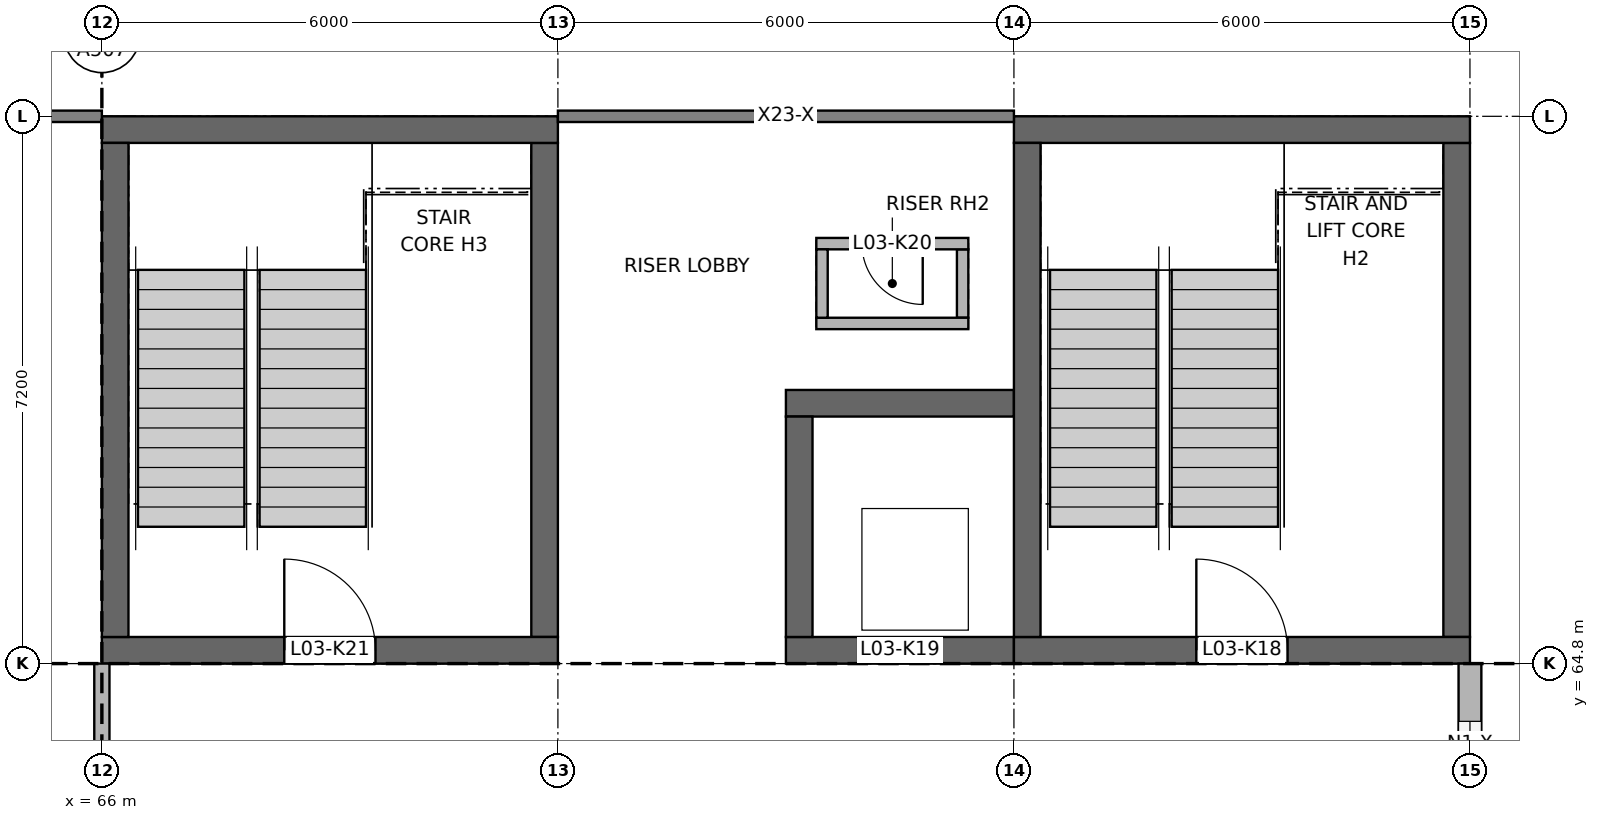
"""IFC4 building model, lengths in metres.
Left out: names, types, materials, properties, quantities, classifications, styles, units other than length and angle.
Written with IfcOpenShell. Run it as: python <this file> out.ifc"""

import sys

from ifc_helpers import new_model, si_unit, direction, frame, frame_2d, origin, place, context, subcontext, project, spatial, rectangle, extrude, element, fill, save


model = new_model("IFC4")
c1 = context("Model", 3, precision=1e-05, world=origin(), true_north=direction((0.0, 1.0)))
c2 = subcontext(c1, "Body", "Model", "MODEL_VIEW")
j1 = project(units=[si_unit("LENGTHUNIT", "METRE"), si_unit("PLANEANGLEUNIT", "RADIAN")], contexts=[c1])
p1 = place(None, origin())
s1 = spatial("IfcSite", under=j1, at=p1, CompositionType="ELEMENT")
p2 = place(p1, origin())
s2 = spatial("IfcBuilding", under=s1, at=p2, CompositionType="ELEMENT")
p3 = place(p2, frame((0.0, 0.0, 12.6)))
s3 = spatial("IfcBuildingStorey", under=s2, at=p3, CompositionType="ELEMENT", Elevation=12.6)
p4 = place(p3, frame((78.0, 64.975, 0.0), z_axis=(0.0, 0.0, 1.0), x_axis=(1.0, 0.0, 0.0)))
e1 = element("IfcWall", 1, at=p4, inside=s3, PredefinedType="SHEAR", context=c2, shape_type="SweptSolid", body=[
    extrude(rectangle(XDim=6.0, YDim=0.35, at=frame_2d((3.0, 0.0))), origin(), (0.0, 0.0, 1.0), 4.0),
])
p5 = place(p4, frame((2.4, 0.0, 0.0)))
e2 = element("IfcOpeningElement", 2, at=p5, cuts=e1, PredefinedType="OPENING", context=c2, shape_type="SweptSolid", body=[
    extrude(rectangle(XDim=1.2, YDim=2.1, at=frame_2d((0.6, 1.05))), frame((0.0, 0.185, 0.0), z_axis=(0.0, -1.0, 0.0), x_axis=(1.0, 0.0, 0.0)), (0.0, 0.0, 1.0), 0.37),
])
p6 = place(p3, frame((78.0, 71.825, 0.0), z_axis=(0.0, 0.0, 1.0), x_axis=(1.0, 0.0, 0.0)))
e3 = element("IfcWall", 3, at=p6, inside=s3, PredefinedType="SHEAR", context=c2, shape_type="SweptSolid", body=[
    extrude(rectangle(XDim=6.0, YDim=0.35, at=frame_2d((3.0, 0.0))), origin(), (0.0, 0.0, 1.0), 4.0),
])
for number, where, z_axis, x_axis in (
    (4, (78.175, 65.15, 0.0), (0.0, 0.0, 1.0), (0.0, 1.0, 0.0)),
    (5, (83.825, 65.15, 0.0), (0.0, 0.0, 1.0), (0.0, 1.0, 0.0)),
):
    element("IfcWall", number, at=place(p3, frame(where, z_axis=z_axis, x_axis=x_axis)), inside=s3, PredefinedType="SHEAR", context=c2, shape_type="SweptSolid", body=[
        extrude(rectangle(XDim=6.5, YDim=0.35, at=frame_2d((3.25, 0.0))), origin(), (0.0, 0.0, 1.0), 4.0),
    ])
p7 = place(p3, frame((75.0, 64.975, 0.0), z_axis=(0.0, 0.0, 1.0), x_axis=(1.0, 0.0, 0.0)))
e6 = element("IfcWall", 6, at=p7, inside=s3, PredefinedType="SHEAR", context=c2, shape_type="SweptSolid", body=[
    extrude(rectangle(XDim=3.0, YDim=0.35, at=frame_2d((1.5, 0.0))), origin(), (0.0, 0.0, 1.0), 4.2),
])
p8 = place(p7, frame((0.95, 0.0, 0.0)))
e7 = element("IfcOpeningElement", 7, at=p8, cuts=e6, PredefinedType="OPENING", context=c2, shape_type="SweptSolid", body=[
    extrude(rectangle(XDim=1.1, YDim=2.1, at=frame_2d((0.55, 1.05))), frame((0.0, 0.185, 0.0), z_axis=(0.0, -1.0, 0.0), x_axis=(1.0, 0.0, 0.0)), (0.0, 0.0, 1.0), 0.37),
])
p9 = place(p3, frame((75.0, 68.225, 0.0), z_axis=(0.0, 0.0, 1.0), x_axis=(1.0, 0.0, 0.0)))
e8 = element("IfcWall", 8, at=p9, inside=s3, PredefinedType="SHEAR", context=c2, shape_type="SweptSolid", body=[
    extrude(rectangle(XDim=3.0, YDim=0.35, at=frame_2d((1.5, 0.0))), origin(), (0.0, 0.0, 1.0), 4.2),
])
p10 = place(p3, frame((75.175, 65.15, 0.0), z_axis=(0.0, 0.0, 1.0), x_axis=(0.0, 1.0, 0.0)))
e9 = element("IfcWall", 9, at=p10, inside=s3, PredefinedType="SHEAR", context=c2, shape_type="SweptSolid", body=[
    extrude(rectangle(XDim=2.9, YDim=0.35, at=frame_2d((1.45, 0.0))), origin(), (0.0, 0.0, 1.0), 4.2),
])
p11 = place(p3, frame((66.0, 64.975, 0.0), z_axis=(0.0, 0.0, 1.0), x_axis=(1.0, 0.0, 0.0)))
e10 = element("IfcWall", 10, at=p11, inside=s3, PredefinedType="SHEAR", context=c2, shape_type="SweptSolid", body=[
    extrude(rectangle(XDim=6.0, YDim=0.35, at=frame_2d((3.0, 0.0))), origin(), (0.0, 0.0, 1.0), 4.0),
])
p12 = place(p11, frame((2.4, 0.0, 0.0)))
e11 = element("IfcOpeningElement", 11, at=p12, cuts=e10, PredefinedType="OPENING", context=c2, shape_type="SweptSolid", body=[
    extrude(rectangle(XDim=1.2, YDim=2.1, at=frame_2d((0.6, 1.05))), frame((0.0, 0.185, 0.0), z_axis=(0.0, -1.0, 0.0), x_axis=(1.0, 0.0, 0.0)), (0.0, 0.0, 1.0), 0.37),
])
p13 = place(p3, frame((66.0, 71.825, 0.0), z_axis=(0.0, 0.0, 1.0), x_axis=(1.0, 0.0, 0.0)))
e12 = element("IfcWall", 12, at=p13, inside=s3, PredefinedType="SHEAR", context=c2, shape_type="SweptSolid", body=[
    extrude(rectangle(XDim=6.0, YDim=0.35, at=frame_2d((3.0, 0.0))), origin(), (0.0, 0.0, 1.0), 4.0),
])
for number, where, z_axis, x_axis in (
    (13, (66.175, 65.15, 0.0), (0.0, 0.0, 1.0), (0.0, 1.0, 0.0)),
    (14, (71.825, 65.15, 0.0), (0.0, 0.0, 1.0), (0.0, 1.0, 0.0)),
):
    element("IfcWall", number, at=place(p3, frame(where, z_axis=z_axis, x_axis=x_axis)), inside=s3, PredefinedType="SHEAR", context=c2, shape_type="SweptSolid", body=[
        extrude(rectangle(XDim=6.5, YDim=0.35, at=frame_2d((3.25, 0.0))), origin(), (0.0, 0.0, 1.0), 4.0),
    ])
p14 = place(p3, frame((75.4, 69.275, 0.0), z_axis=(0.0, 0.0, 1.0), x_axis=(1.0, 0.0, 0.0)))
e15 = element("IfcWall", 15, at=p14, inside=s3, PredefinedType="SOLIDWALL", context=c2, shape_type="SweptSolid", body=[
    extrude(rectangle(XDim=2.0, YDim=0.15, at=frame_2d((1.0, 0.0))), origin(), (0.0, 0.0, 1.0), 4.2),
])
p15 = place(p3, frame((75.4, 70.325, 0.0), z_axis=(0.0, 0.0, 1.0), x_axis=(1.0, 0.0, 0.0)))
e16 = element("IfcWall", 16, at=p15, inside=s3, PredefinedType="SOLIDWALL", context=c2, shape_type="SweptSolid", body=[
    extrude(rectangle(XDim=2.0, YDim=0.15, at=frame_2d((1.0, 0.0))), origin(), (0.0, 0.0, 1.0), 4.2),
])
p16 = place(p15, frame((0.6, 0.0, 0.0)))
e17 = element("IfcOpeningElement", 17, at=p16, cuts=e16, PredefinedType="OPENING", context=c2, shape_type="SweptSolid", body=[
    extrude(rectangle(XDim=0.8, YDim=2.1, at=frame_2d((0.4, 1.05))), frame((0.0, 0.085, 0.0), z_axis=(0.0, -1.0, 0.0), x_axis=(1.0, 0.0, 0.0)), (0.0, 0.0, 1.0), 0.17),
])
for number, where, z_axis, x_axis in (
    (18, (75.475, 69.35, 0.0), (0.0, 0.0, 1.0), (0.0, 1.0, 0.0)),
    (19, (77.325, 69.35, 0.0), (0.0, 0.0, 1.0), (0.0, 1.0, 0.0)),
):
    element("IfcWall", number, at=place(p3, frame(where, z_axis=z_axis, x_axis=x_axis)), inside=s3, PredefinedType="SOLIDWALL", context=c2, shape_type="SweptSolid", body=[
        extrude(rectangle(XDim=0.9, YDim=0.15, at=frame_2d((0.45, 0.0))), origin(), (0.0, 0.0, 1.0), 4.2),
    ])
p17 = place(p3, frame((84.0, 58.1, 0.0), z_axis=(0.0, 0.0, 1.0), x_axis=(0.0, 1.0, 0.0)))
e20 = element("IfcWall", 20, at=p17, inside=s3, PredefinedType="SOLIDWALL", context=c2, shape_type="SweptSolid", body=[
    extrude(rectangle(XDim=6.7, YDim=0.3, at=frame_2d((3.35, 0.0))), origin(), (0.0, 0.0, 1.0), 3.1),
])
p18 = place(p17, frame((0.555, 0.0, 0.9)))
e21 = element("IfcOpeningElement", 21, at=p18, cuts=e20, PredefinedType="OPENING", context=c2, shape_type="SweptSolid", body=[
    extrude(rectangle(XDim=0.6, YDim=1.9, at=frame_2d((0.3, 0.95))), frame((0.0, 0.16, 0.0), z_axis=(0.0, -1.0, 0.0), x_axis=(1.0, 0.0, 0.0)), (0.0, 0.0, 1.0), 0.32),
])
p19 = place(p17, frame((1.71, 0.0, 0.9)))
e22 = element("IfcOpeningElement", 22, at=p19, cuts=e20, PredefinedType="OPENING", context=c2, shape_type="SweptSolid", body=[
    extrude(rectangle(XDim=0.6, YDim=1.9, at=frame_2d((0.3, 0.95))), frame((0.0, 0.16, 0.0), z_axis=(0.0, -1.0, 0.0), x_axis=(1.0, 0.0, 0.0)), (0.0, 0.0, 1.0), 0.32),
])
p20 = place(p17, frame((2.865, 0.0, 0.9)))
e23 = element("IfcOpeningElement", 23, at=p20, cuts=e20, PredefinedType="OPENING", context=c2, shape_type="SweptSolid", body=[
    extrude(rectangle(XDim=0.6, YDim=1.9, at=frame_2d((0.3, 0.95))), frame((0.0, 0.16, 0.0), z_axis=(0.0, -1.0, 0.0), x_axis=(1.0, 0.0, 0.0)), (0.0, 0.0, 1.0), 0.32),
])
p21 = place(p17, frame((5.34, 0.0, 0.9)))
e24 = element("IfcOpeningElement", 24, at=p21, cuts=e20, PredefinedType="OPENING", context=c2, shape_type="SweptSolid", body=[
    extrude(rectangle(XDim=0.6, YDim=1.9, at=frame_2d((0.3, 0.95))), frame((0.0, 0.16, 0.0), z_axis=(0.0, -1.0, 0.0), x_axis=(1.0, 0.0, 0.0)), (0.0, 0.0, 1.0), 0.32),
])
p22 = place(p3, frame((66.0, 58.1, 0.0), z_axis=(0.0, 0.0, 1.0), x_axis=(0.0, 1.0, 0.0)))
e25 = element("IfcWall", 25, at=p22, inside=s3, PredefinedType="PARTITIONING", context=c2, shape_type="SweptSolid", body=[
    extrude(rectangle(XDim=6.7, YDim=0.2, at=frame_2d((3.35, 0.0))), origin(), (0.0, 0.0, 1.0), 7.3),
])
p23 = place(p21, origin())
e26 = element("IfcWindow", 26, at=p23, inside=s3, PartitioningType="SINGLE_PANEL", PredefinedType="WINDOW", context=c2, shape_type="SweptSolid", body=[
    extrude(rectangle(XDim=0.6, YDim=1.9, at=frame_2d((0.3, 0.95))), frame((0.0, 0.03, 0.0), z_axis=(0.0, -1.0, 0.0), x_axis=(1.0, 0.0, 0.0)), (0.0, 0.0, 1.0), 0.06),
])
fill(e24, e26)
p24 = place(p5, origin())
e27 = element("IfcDoor", 27, at=p24, inside=s3, OperationType="SINGLE_SWING_LEFT", PredefinedType="DOOR", context=c2, shape_type="SweptSolid", body=[
    extrude(rectangle(XDim=1.2, YDim=2.1, at=frame_2d((0.6, 1.05))), frame((0.0, 0.025, 0.0), z_axis=(0.0, -1.0, 0.0), x_axis=(1.0, 0.0, 0.0)), (0.0, 0.0, 1.0), 0.05),
])
fill(e2, e27)
p25 = place(p8, origin())
e28 = element("IfcDoor", 28, at=p25, inside=s3, OperationType="DOUBLE_DOOR_SLIDING", PredefinedType="DOOR", context=c2, shape_type="SweptSolid", body=[
    extrude(rectangle(XDim=1.1, YDim=2.1, at=frame_2d((0.55, 1.05))), frame((0.0, 0.025, 0.0), z_axis=(0.0, -1.0, 0.0), x_axis=(1.0, 0.0, 0.0)), (0.0, 0.0, 1.0), 0.05),
])
fill(e7, e28)
p26 = place(p16, frame((0.8, 0.0, 0.0), z_axis=(0.0, 0.0, 1.0), x_axis=(-1.0, 0.0, 0.0)))
e29 = element("IfcDoor", 29, at=p26, inside=s3, OperationType="SINGLE_SWING_LEFT", PredefinedType="DOOR", context=c2, shape_type="SweptSolid", body=[
    extrude(rectangle(XDim=0.8, YDim=2.1, at=frame_2d((0.4, 1.05))), frame((0.0, 0.025, 0.0), z_axis=(0.0, -1.0, 0.0), x_axis=(1.0, 0.0, 0.0)), (0.0, 0.0, 1.0), 0.05),
])
fill(e17, e29)
p27 = place(p12, origin())
e30 = element("IfcDoor", 30, at=p27, inside=s3, OperationType="SINGLE_SWING_LEFT", PredefinedType="DOOR", context=c2, shape_type="SweptSolid", body=[
    extrude(rectangle(XDim=1.2, YDim=2.1, at=frame_2d((0.6, 1.05))), frame((0.0, 0.025, 0.0), z_axis=(0.0, -1.0, 0.0), x_axis=(1.0, 0.0, 0.0)), (0.0, 0.0, 1.0), 0.05),
])
fill(e11, e30)
save(model, sys.argv[1])
